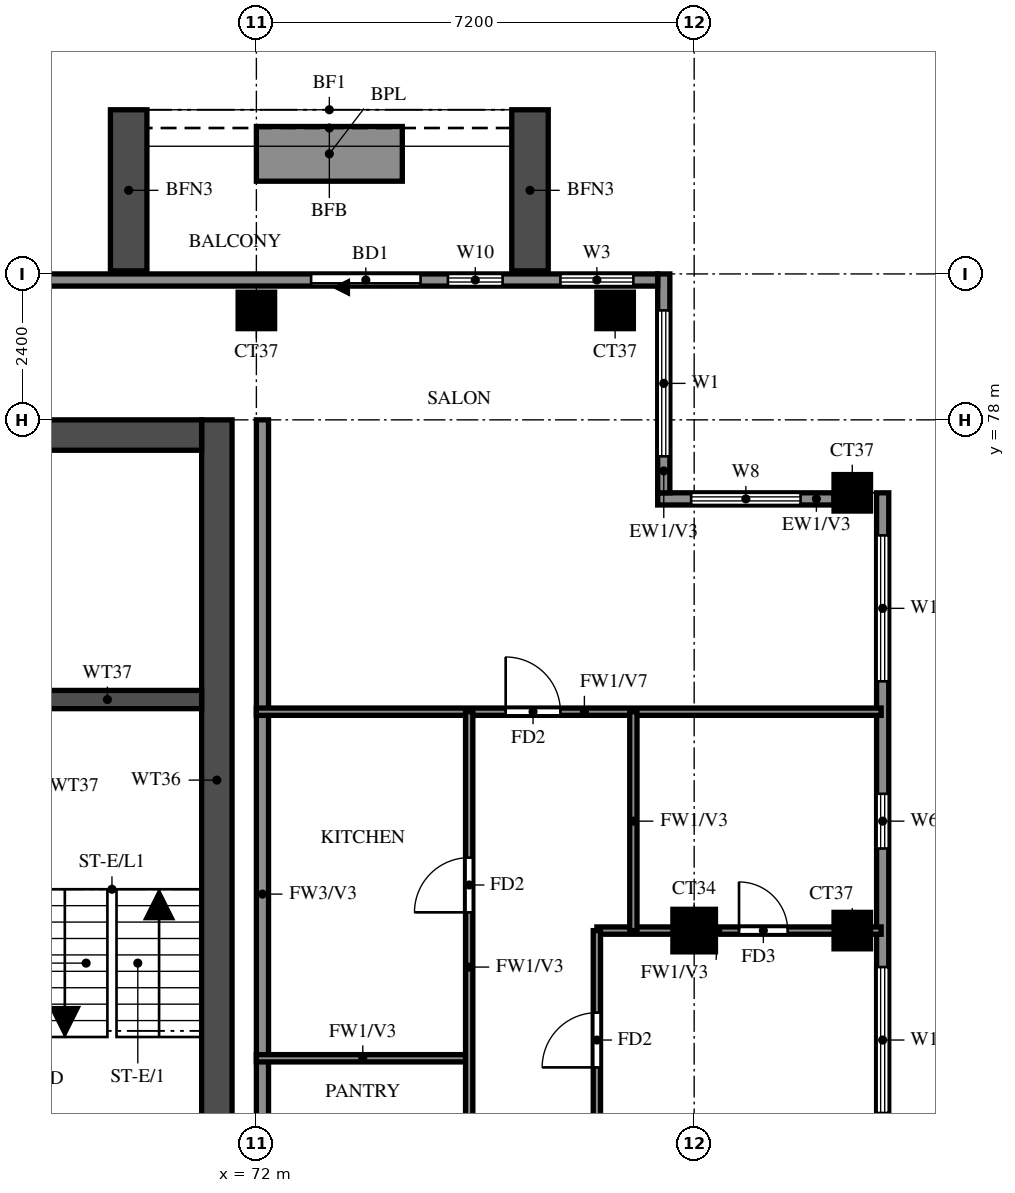
"""IFC4 building model, lengths in metres.
Left out: names, types, materials, properties, quantities, classifications, styles, units other than length and angle.
Written with IfcOpenShell. Run it as: python <this file> out.ifc"""

import sys

from ifc_helpers import new_model, si_unit, direction, frame, frame_2d, origin, origin_2d, place, context, subcontext, project, spatial, rectangle, extrude, source, transform, mapped, element, fill, save


model = new_model("IFC4")
c1 = context("Model", 3, precision=1e-05, world=origin(), true_north=direction((0.0, 1.0)))
c2 = subcontext(c1, "Body", "Model", "MODEL_VIEW")
j1 = project(units=[si_unit("LENGTHUNIT", "METRE"), si_unit("PLANEANGLEUNIT", "RADIAN")], contexts=[c1])
p1 = place(None, origin())
s1 = spatial("IfcSite", under=j1, at=p1, CompositionType="ELEMENT")
p2 = place(p1, origin())
s2 = spatial("IfcBuilding", under=s1, at=p2, CompositionType="ELEMENT")
p3 = place(p2, frame((0.0, 0.0, 257.0)))
s3 = spatial("IfcBuildingStorey", under=s2, at=p3, CompositionType="ELEMENT", Elevation=257.0)
m1 = source(origin(), c2, "Body", "SweptSolid", [
    extrude(rectangle(XDim=0.7, YDim=0.7, at=origin_2d()), origin(), (0.0, 0.0, 1.0), 3.22),
])
p4 = place(p3, frame((79.2, 69.6, 0.0), z_axis=(0.0, 0.0, 1.0), x_axis=(1.0, 0.0, 0.0)))
e1 = element("IfcColumn", 1, at=p4, inside=s3, PredefinedType="COLUMN", context=c2, shape_type="MappedRepresentation", body=[
    mapped(m1, transform((0.0, 0.0, 0.0))),
])
m2 = source(origin(), c2, "Body", "SweptSolid", [
    extrude(rectangle(XDim=0.6, YDim=0.6, at=origin_2d()), origin(), (0.0, 0.0, 1.0), 3.22),
])
for number, where, z_axis, x_axis in (
    (2, (81.8, 69.6, 0.0), (0.0, 0.0, 1.0), (1.0, 0.0, 0.0)),
    (3, (81.8, 76.8, 0.0), (0.0, 0.0, 1.0), (1.0, 0.0, 0.0)),
    (4, (72.0, 79.8, 0.0), (0.0, 0.0, 1.0), (1.0, 0.0, 0.0)),
    (5, (77.9, 79.8, 0.0), (0.0, 0.0, 1.0), (1.0, 0.0, 0.0)),
):
    element("IfcColumn", number, at=place(p3, frame(where, z_axis=z_axis, x_axis=x_axis)), inside=s3, PredefinedType="COLUMN", context=c2, shape_type="MappedRepresentation", body=[
        mapped(m2, transform((0.0, 0.0, 0.0))),
    ])
p5 = place(p3, frame((71.35, 66.15, 0.0), z_axis=(0.0, 0.0, 1.0), x_axis=(0.0, 1.0, 0.0)))
e6 = element("IfcWall", 6, at=p5, inside=s3, PredefinedType="SHEAR", context=c2, shape_type="SweptSolid", body=[
    extrude(rectangle(XDim=11.85, YDim=0.5, at=frame_2d((5.925, 0.0))), origin(), (0.0, 0.0, 1.0), 3.22),
])
p6 = place(p3, frame((29.7, 77.75, 0.0), z_axis=(0.0, 0.0, 1.0), x_axis=(1.0, 0.0, 0.0)))
e7 = element("IfcWall", 7, at=p6, inside=s3, PredefinedType="SHEAR", context=c2, shape_type="SweptSolid", body=[
    extrude(rectangle(XDim=41.4, YDim=0.5, at=frame_2d((20.7, 0.0))), origin(), (0.0, 0.0, 1.0), 3.22),
])
p7 = place(p3, frame((68.0, 73.4, 0.0), z_axis=(0.0, 0.0, 1.0), x_axis=(1.0, 0.0, 0.0)))
e8 = element("IfcWall", 8, at=p7, inside=s3, PredefinedType="SHEAR", context=c2, shape_type="SweptSolid", body=[
    extrude(rectangle(XDim=3.1, YDim=0.3, at=frame_2d((1.55, 0.0))), origin(), (0.0, 0.0, 1.0), 3.22),
])
p8 = place(p3, frame((82.3, 48.2, 0.0), z_axis=(0.0, 0.0, 1.0), x_axis=(0.0, 1.0, 0.0)))
e9 = element("IfcWall", 9, at=p8, inside=s3, PredefinedType="SOLIDWALL", context=c2, shape_type="SweptSolid", body=[
    extrude(rectangle(XDim=28.6, YDim=0.2, at=frame_2d((14.3, 0.0))), origin(), (0.0, 0.0, 1.0), 3.22),
])
p9 = place(p8, frame((7.9, 0.0, 0.0)))
e10 = element("IfcOpeningElement", 10, at=p9, cuts=e9, PredefinedType="OPENING", context=c2, shape_type="SweptSolid", body=[
    extrude(rectangle(XDim=1.8, YDim=2.4, at=frame_2d((0.9, 1.2))), frame((0.0, 0.11, 0.0), z_axis=(0.0, -1.0, 0.0), x_axis=(1.0, 0.0, 0.0)), (0.0, 0.0, 1.0), 0.22),
])
p10 = place(p8, frame((0.6, 0.0, 0.6)))
e11 = element("IfcOpeningElement", 11, at=p10, cuts=e9, PredefinedType="OPENING", context=c2, shape_type="SweptSolid", body=[
    extrude(rectangle(XDim=2.4, YDim=2.4, at=frame_2d((1.2, 1.2))), frame((0.0, 0.11, 0.0), z_axis=(0.0, -1.0, 0.0), x_axis=(1.0, 0.0, 0.0)), (0.0, 0.0, 1.0), 0.22),
])
p11 = place(p8, frame((3.55, 0.0, 0.6)))
e12 = element("IfcOpeningElement", 12, at=p11, cuts=e9, PredefinedType="OPENING", context=c2, shape_type="SweptSolid", body=[
    extrude(rectangle(XDim=0.9, YDim=2.4, at=frame_2d((0.45, 1.2))), frame((0.0, 0.11, 0.0), z_axis=(0.0, -1.0, 0.0), x_axis=(1.0, 0.0, 0.0)), (0.0, 0.0, 1.0), 0.22),
])
p12 = place(p8, frame((5.5, 0.0, 0.6)))
e13 = element("IfcOpeningElement", 13, at=p12, cuts=e9, PredefinedType="OPENING", context=c2, shape_type="SweptSolid", body=[
    extrude(rectangle(XDim=1.2, YDim=2.4, at=frame_2d((0.6, 1.2))), frame((0.0, 0.11, 0.0), z_axis=(0.0, -1.0, 0.0), x_axis=(1.0, 0.0, 0.0)), (0.0, 0.0, 1.0), 0.22),
])
p13 = place(p8, frame((10.15, 0.0, 0.6)))
e14 = element("IfcOpeningElement", 14, at=p13, cuts=e9, PredefinedType="OPENING", context=c2, shape_type="SweptSolid", body=[
    extrude(rectangle(XDim=0.9, YDim=2.4, at=frame_2d((0.45, 1.2))), frame((0.0, 0.11, 0.0), z_axis=(0.0, -1.0, 0.0), x_axis=(1.0, 0.0, 0.0)), (0.0, 0.0, 1.0), 0.22),
])
p14 = place(p8, frame((12.1, 0.0, 0.6)))
e15 = element("IfcOpeningElement", 15, at=p14, cuts=e9, PredefinedType="OPENING", context=c2, shape_type="SweptSolid", body=[
    extrude(rectangle(XDim=1.8, YDim=2.4, at=frame_2d((0.9, 1.2))), frame((0.0, 0.11, 0.0), z_axis=(0.0, -1.0, 0.0), x_axis=(1.0, 0.0, 0.0)), (0.0, 0.0, 1.0), 0.22),
])
p15 = place(p8, frame((14.8, 0.0, 0.6)))
e16 = element("IfcOpeningElement", 16, at=p15, cuts=e9, PredefinedType="OPENING", context=c2, shape_type="SweptSolid", body=[
    extrude(rectangle(XDim=2.4, YDim=2.4, at=frame_2d((1.2, 1.2))), frame((0.0, 0.11, 0.0), z_axis=(0.0, -1.0, 0.0), x_axis=(1.0, 0.0, 0.0)), (0.0, 0.0, 1.0), 0.22),
])
p16 = place(p8, frame((18.4, 0.0, 0.6)))
e17 = element("IfcOpeningElement", 17, at=p16, cuts=e9, PredefinedType="OPENING", context=c2, shape_type="SweptSolid", body=[
    extrude(rectangle(XDim=2.4, YDim=2.4, at=frame_2d((1.2, 1.2))), frame((0.0, 0.11, 0.0), z_axis=(0.0, -1.0, 0.0), x_axis=(1.0, 0.0, 0.0)), (0.0, 0.0, 1.0), 0.22),
])
p17 = place(p8, frame((22.75, 0.0, 1.5)))
e18 = element("IfcOpeningElement", 18, at=p17, cuts=e9, PredefinedType="OPENING", context=c2, shape_type="SweptSolid", body=[
    extrude(rectangle(XDim=0.9, YDim=0.9, at=frame_2d((0.45, 0.45))), frame((0.0, 0.11, 0.0), z_axis=(0.0, -1.0, 0.0), x_axis=(1.0, 0.0, 0.0)), (0.0, 0.0, 1.0), 0.22),
])
p18 = place(p8, frame((25.5, 0.0, 0.6)))
e19 = element("IfcOpeningElement", 19, at=p18, cuts=e9, PredefinedType="OPENING", context=c2, shape_type="SweptSolid", body=[
    extrude(rectangle(XDim=2.4, YDim=2.4, at=frame_2d((1.2, 1.2))), frame((0.0, 0.11, 0.0), z_axis=(0.0, -1.0, 0.0), x_axis=(1.0, 0.0, 0.0)), (0.0, 0.0, 1.0), 0.22),
])
p19 = place(p3, frame((81.5, 76.7, 0.0), z_axis=(0.0, 0.0, 1.0), x_axis=(-1.0, 0.0, 0.0)))
e20 = element("IfcWall", 20, at=p19, inside=s3, PredefinedType="SOLIDWALL", context=c2, shape_type="SweptSolid", body=[
    extrude(rectangle(XDim=2.9, YDim=0.2, at=frame_2d((1.45, 0.0))), origin(), (0.0, 0.0, 1.0), 3.22),
])
p20 = place(p19, frame((0.55, 0.0, 0.6)))
e21 = element("IfcOpeningElement", 21, at=p20, cuts=e20, PredefinedType="OPENING", context=c2, shape_type="SweptSolid", body=[
    extrude(rectangle(XDim=1.8, YDim=2.4, at=frame_2d((0.9, 1.2))), frame((0.0, 0.11, 0.0), z_axis=(0.0, -1.0, 0.0), x_axis=(1.0, 0.0, 0.0)), (0.0, 0.0, 1.0), 0.22),
])
p21 = place(p3, frame((78.7, 76.8, 0.0), z_axis=(0.0, 0.0, 1.0), x_axis=(0.0, 1.0, 0.0)))
e22 = element("IfcWall", 22, at=p21, inside=s3, PredefinedType="SOLIDWALL", context=c2, shape_type="SweptSolid", body=[
    extrude(rectangle(XDim=3.6, YDim=0.2, at=frame_2d((1.8, 0.0))), origin(), (0.0, 0.0, 1.0), 3.22),
])
p22 = place(p21, frame((0.6, 0.0, 0.6)))
e23 = element("IfcOpeningElement", 23, at=p22, cuts=e22, PredefinedType="OPENING", context=c2, shape_type="SweptSolid", body=[
    extrude(rectangle(XDim=2.4, YDim=2.4, at=frame_2d((1.2, 1.2))), frame((0.0, 0.11, 0.0), z_axis=(0.0, -1.0, 0.0), x_axis=(1.0, 0.0, 0.0)), (0.0, 0.0, 1.0), 0.22),
])
p23 = place(p3, frame((78.6, 80.3, 0.0), z_axis=(0.0, 0.0, 1.0), x_axis=(-1.0, 0.0, 0.0)))
e24 = element("IfcWall", 24, at=p23, inside=s3, PredefinedType="SOLIDWALL", context=c2, shape_type="SweptSolid", body=[
    extrude(rectangle(XDim=56.6, YDim=0.2, at=frame_2d((28.3, 0.0))), origin(), (0.0, 0.0, 1.0), 3.22),
])
p24 = place(p23, frame((3.9, 0.0, 0.0)))
e25 = element("IfcOpeningElement", 25, at=p24, cuts=e24, PredefinedType="OPENING", context=c2, shape_type="SweptSolid", body=[
    extrude(rectangle(XDim=1.8, YDim=2.4, at=frame_2d((0.9, 1.2))), frame((0.0, 0.11, 0.0), z_axis=(0.0, -1.0, 0.0), x_axis=(1.0, 0.0, 0.0)), (0.0, 0.0, 1.0), 0.22),
])
p25 = place(p23, frame((50.433, 0.0, 0.6)))
e26 = element("IfcOpeningElement", 26, at=p25, cuts=e24, PredefinedType="OPENING", context=c2, shape_type="SweptSolid", body=[
    extrude(rectangle(XDim=2.4, YDim=2.4, at=frame_2d((1.2, 1.2))), frame((0.0, 0.11, 0.0), z_axis=(0.0, -1.0, 0.0), x_axis=(1.0, 0.0, 0.0)), (0.0, 0.0, 1.0), 0.22),
])
p26 = place(p23, frame((53.367, 0.0, 0.6)))
e27 = element("IfcOpeningElement", 27, at=p26, cuts=e24, PredefinedType="OPENING", context=c2, shape_type="SweptSolid", body=[
    extrude(rectangle(XDim=2.4, YDim=2.4, at=frame_2d((1.2, 1.2))), frame((0.0, 0.11, 0.0), z_axis=(0.0, -1.0, 0.0), x_axis=(1.0, 0.0, 0.0)), (0.0, 0.0, 1.0), 0.22),
])
p27 = place(p23, frame((0.4, 0.0, 0.6)))
e28 = element("IfcOpeningElement", 28, at=p27, cuts=e24, PredefinedType="OPENING", context=c2, shape_type="SweptSolid", body=[
    extrude(rectangle(XDim=1.2, YDim=2.4, at=frame_2d((0.6, 1.2))), frame((0.0, 0.11, 0.0), z_axis=(0.0, -1.0, 0.0), x_axis=(1.0, 0.0, 0.0)), (0.0, 0.0, 1.0), 0.22),
])
p28 = place(p23, frame((2.55, 0.0, 0.6)))
e29 = element("IfcOpeningElement", 29, at=p28, cuts=e24, PredefinedType="OPENING", context=c2, shape_type="SweptSolid", body=[
    extrude(rectangle(XDim=0.9, YDim=2.4, at=frame_2d((0.45, 1.2))), frame((0.0, 0.11, 0.0), z_axis=(0.0, -1.0, 0.0), x_axis=(1.0, 0.0, 0.0)), (0.0, 0.0, 1.0), 0.22),
])
for number, where, z_axis, x_axis in (
    (30, (76.5, 80.45, 0.0), (0.0, 0.0, 1.0), (0.0, 1.0, 0.0)),
    (31, (69.9, 80.45, 0.0), (0.0, 0.0, 1.0), (0.0, 1.0, 0.0)),
):
    element("IfcWall", number, at=place(p3, frame(where, z_axis=z_axis, x_axis=x_axis)), inside=s3, PredefinedType="SOLIDWALL", context=c2, shape_type="SweptSolid", body=[
        extrude(rectangle(XDim=2.65, YDim=0.6, at=frame_2d((1.325, 0.0))), origin(), (0.0, 0.0, 1.0), 2.85),
    ])
p29 = place(p3, frame((74.4, 82.375, 0.0), z_axis=(0.0, 0.0, 1.0), x_axis=(-1.0, 0.0, 0.0)))
e32 = element("IfcWall", 32, at=p29, inside=s3, PredefinedType="SOLIDWALL", context=c2, shape_type="SweptSolid", body=[
    extrude(rectangle(XDim=2.4, YDim=0.9, at=frame_2d((1.2, 0.0))), origin(), (0.0, 0.0, 1.0), 0.9),
])
p30 = place(p3, frame((72.1, 62.4, 0.0), z_axis=(0.0, 0.0, 1.0), x_axis=(0.0, 1.0, 0.0)))
e33 = element("IfcWall", 33, at=p30, inside=s3, PredefinedType="SOLIDWALL", context=c2, shape_type="SweptSolid", body=[
    extrude(rectangle(XDim=15.6, YDim=0.2, at=frame_2d((7.8, 0.0))), origin(), (0.0, 0.0, 1.0), 3.22),
])
p31 = place(p3, frame((72.0, 67.5, 0.0), z_axis=(0.0, 0.0, 1.0), x_axis=(1.0, 0.0, 0.0)))
e34 = element("IfcWall", 34, at=p31, inside=s3, PredefinedType="PARTITIONING", context=c2, shape_type="SweptSolid", body=[
    extrude(rectangle(XDim=3.5, YDim=0.12, at=frame_2d((1.75, 0.0))), origin(), (0.0, 0.0, 1.0), 3.22),
])
p32 = place(p3, frame((77.6, 69.6, 0.0), z_axis=(0.0, 0.0, 1.0), x_axis=(1.0, 0.0, 0.0)))
e35 = element("IfcWall", 35, at=p32, inside=s3, PredefinedType="PARTITIONING", context=c2, shape_type="SweptSolid", body=[
    extrude(rectangle(XDim=4.675, YDim=0.12, at=frame_2d((2.337, 0.0))), origin(), (0.0, 0.0, 1.0), 3.22),
])
p33 = place(p32, frame((2.337, 0.0, 0.0)))
e36 = element("IfcOpeningElement", 36, at=p33, cuts=e35, PredefinedType="OPENING", context=c2, shape_type="SweptSolid", body=[
    extrude(rectangle(XDim=0.8, YDim=2.1, at=frame_2d((0.4, 1.05))), frame((0.0, 0.07, 0.0), z_axis=(0.0, -1.0, 0.0), x_axis=(1.0, 0.0, 0.0)), (0.0, 0.0, 1.0), 0.14),
])
p34 = place(p3, frame((72.0, 73.2, 0.0), z_axis=(0.0, 0.0, 1.0), x_axis=(1.0, 0.0, 0.0)))
e37 = element("IfcWall", 37, at=p34, inside=s3, PredefinedType="PARTITIONING", context=c2, shape_type="SweptSolid", body=[
    extrude(rectangle(XDim=10.275, YDim=0.12, at=frame_2d((5.137, 0.0))), origin(), (0.0, 0.0, 1.0), 2.32),
])
p35 = place(p34, frame((4.1, 0.0, 0.0)))
e38 = element("IfcOpeningElement", 38, at=p35, cuts=e37, PredefinedType="OPENING", context=c2, shape_type="SweptSolid", body=[
    extrude(rectangle(XDim=0.9, YDim=2.1, at=frame_2d((0.45, 1.05))), frame((0.0, 0.07, 0.0), z_axis=(0.0, -1.0, 0.0), x_axis=(1.0, 0.0, 0.0)), (0.0, 0.0, 1.0), 0.14),
])
p36 = place(p3, frame((75.5, 64.8, 0.0), z_axis=(0.0, 0.0, 1.0), x_axis=(0.0, 1.0, 0.0)))
e39 = element("IfcWall", 39, at=p36, inside=s3, PredefinedType="PARTITIONING", context=c2, shape_type="SweptSolid", body=[
    extrude(rectangle(XDim=8.4, YDim=0.12, at=frame_2d((4.2, 0.0))), origin(), (0.0, 0.0, 1.0), 3.22),
])
p37 = place(p36, frame((5.1, 0.0, 0.0)))
e40 = element("IfcOpeningElement", 40, at=p37, cuts=e39, PredefinedType="OPENING", context=c2, shape_type="SweptSolid", body=[
    extrude(rectangle(XDim=0.9, YDim=2.1, at=frame_2d((0.45, 1.05))), frame((0.0, 0.07, 0.0), z_axis=(0.0, -1.0, 0.0), x_axis=(1.0, 0.0, 0.0)), (0.0, 0.0, 1.0), 0.14),
])
p38 = place(p3, frame((77.6, 48.125, 0.0), z_axis=(0.0, 0.0, 1.0), x_axis=(0.0, 1.0, 0.0)))
e41 = element("IfcWall", 41, at=p38, inside=s3, PredefinedType="PARTITIONING", context=c2, shape_type="SweptSolid", body=[
    extrude(rectangle(XDim=21.475, YDim=0.12, at=frame_2d((10.738, 0.0))), origin(), (0.0, 0.0, 1.0), 3.22),
])
p39 = place(p38, frame((1.288, 0.0, 0.0)))
e42 = element("IfcOpeningElement", 42, at=p39, cuts=e41, PredefinedType="OPENING", context=c2, shape_type="SweptSolid", body=[
    extrude(rectangle(XDim=0.9, YDim=2.1, at=frame_2d((0.45, 1.05))), frame((0.0, 0.07, 0.0), z_axis=(0.0, -1.0, 0.0), x_axis=(1.0, 0.0, 0.0)), (0.0, 0.0, 1.0), 0.14),
])
p40 = place(p38, frame((4.825, 0.0, 0.0)))
e43 = element("IfcOpeningElement", 43, at=p40, cuts=e41, PredefinedType="OPENING", context=c2, shape_type="SweptSolid", body=[
    extrude(rectangle(XDim=0.9, YDim=2.1, at=frame_2d((0.45, 1.05))), frame((0.0, 0.07, 0.0), z_axis=(0.0, -1.0, 0.0), x_axis=(1.0, 0.0, 0.0)), (0.0, 0.0, 1.0), 0.14),
])
p41 = place(p38, frame((9.925, 0.0, 0.0)))
e44 = element("IfcOpeningElement", 44, at=p41, cuts=e41, PredefinedType="OPENING", context=c2, shape_type="SweptSolid", body=[
    extrude(rectangle(XDim=1.5, YDim=2.1, at=frame_2d((0.75, 1.05))), frame((0.0, 0.07, 0.0), z_axis=(0.0, -1.0, 0.0), x_axis=(1.0, 0.0, 0.0)), (0.0, 0.0, 1.0), 0.14),
])
p42 = place(p38, frame((15.625, 0.0, 0.0)))
e45 = element("IfcOpeningElement", 45, at=p42, cuts=e41, PredefinedType="OPENING", context=c2, shape_type="SweptSolid", body=[
    extrude(rectangle(XDim=0.9, YDim=2.1, at=frame_2d((0.45, 1.05))), frame((0.0, 0.07, 0.0), z_axis=(0.0, -1.0, 0.0), x_axis=(1.0, 0.0, 0.0)), (0.0, 0.0, 1.0), 0.14),
])
p43 = place(p38, frame((19.225, 0.0, 0.0)))
e46 = element("IfcOpeningElement", 46, at=p43, cuts=e41, PredefinedType="OPENING", context=c2, shape_type="SweptSolid", body=[
    extrude(rectangle(XDim=0.9, YDim=2.1, at=frame_2d((0.45, 1.05))), frame((0.0, 0.07, 0.0), z_axis=(0.0, -1.0, 0.0), x_axis=(1.0, 0.0, 0.0)), (0.0, 0.0, 1.0), 0.14),
])
p44 = place(p3, frame((78.2, 69.6, 0.0), z_axis=(0.0, 0.0, 1.0), x_axis=(0.0, 1.0, 0.0)))
e47 = element("IfcWall", 47, at=p44, inside=s3, PredefinedType="PARTITIONING", context=c2, shape_type="SweptSolid", body=[
    extrude(rectangle(XDim=3.6, YDim=0.12, at=frame_2d((1.8, 0.0))), origin(), (0.0, 0.0, 1.0), 3.22),
])
p45 = place(p16, origin())
e48 = element("IfcWindow", 48, at=p45, inside=s3, PartitioningType="DOUBLE_PANEL_VERTICAL", PredefinedType="WINDOW", context=c2, shape_type="SweptSolid", body=[
    extrude(rectangle(XDim=2.4, YDim=2.4, at=frame_2d((1.2, 1.2))), frame((0.0, 0.03, 0.0), z_axis=(0.0, -1.0, 0.0), x_axis=(1.0, 0.0, 0.0)), (0.0, 0.0, 1.0), 0.06),
])
fill(e17, e48)
p46 = place(p17, origin())
e49 = element("IfcWindow", 49, at=p46, inside=s3, PartitioningType="SINGLE_PANEL", PredefinedType="WINDOW", context=c2, shape_type="SweptSolid", body=[
    extrude(rectangle(XDim=0.9, YDim=0.9, at=frame_2d((0.45, 0.45))), frame((0.0, 0.03, 0.0), z_axis=(0.0, -1.0, 0.0), x_axis=(1.0, 0.0, 0.0)), (0.0, 0.0, 1.0), 0.06),
])
fill(e18, e49)
p47 = place(p18, origin())
e50 = element("IfcWindow", 50, at=p47, inside=s3, PartitioningType="DOUBLE_PANEL_VERTICAL", PredefinedType="WINDOW", context=c2, shape_type="SweptSolid", body=[
    extrude(rectangle(XDim=2.4, YDim=2.4, at=frame_2d((1.2, 1.2))), frame((0.0, 0.03, 0.0), z_axis=(0.0, -1.0, 0.0), x_axis=(1.0, 0.0, 0.0)), (0.0, 0.0, 1.0), 0.06),
])
fill(e19, e50)
p48 = place(p20, origin())
e51 = element("IfcWindow", 51, at=p48, inside=s3, PartitioningType="DOUBLE_PANEL_VERTICAL", PredefinedType="WINDOW", context=c2, shape_type="SweptSolid", body=[
    extrude(rectangle(XDim=1.8, YDim=2.4, at=frame_2d((0.9, 1.2))), frame((0.0, 0.03, 0.0), z_axis=(0.0, -1.0, 0.0), x_axis=(1.0, 0.0, 0.0)), (0.0, 0.0, 1.0), 0.06),
])
fill(e21, e51)
p49 = place(p22, origin())
e52 = element("IfcWindow", 52, at=p49, inside=s3, PartitioningType="DOUBLE_PANEL_VERTICAL", PredefinedType="WINDOW", context=c2, shape_type="SweptSolid", body=[
    extrude(rectangle(XDim=2.4, YDim=2.4, at=frame_2d((1.2, 1.2))), frame((0.0, 0.03, 0.0), z_axis=(0.0, -1.0, 0.0), x_axis=(1.0, 0.0, 0.0)), (0.0, 0.0, 1.0), 0.06),
])
fill(e23, e52)
p50 = place(p24, origin())
e53 = element("IfcDoor", 53, at=p50, inside=s3, OperationType="DOUBLE_DOOR_SLIDING", PredefinedType="DOOR", context=c2, shape_type="SweptSolid", body=[
    extrude(rectangle(XDim=1.8, YDim=2.4, at=frame_2d((0.9, 1.2))), frame((0.0, 0.025, 0.0), z_axis=(0.0, -1.0, 0.0), x_axis=(1.0, 0.0, 0.0)), (0.0, 0.0, 1.0), 0.05),
])
fill(e25, e53)
p51 = place(p27, origin())
e54 = element("IfcWindow", 54, at=p51, inside=s3, PartitioningType="SINGLE_PANEL", PredefinedType="WINDOW", context=c2, shape_type="SweptSolid", body=[
    extrude(rectangle(XDim=1.2, YDim=2.4, at=frame_2d((0.6, 1.2))), frame((0.0, 0.03, 0.0), z_axis=(0.0, -1.0, 0.0), x_axis=(1.0, 0.0, 0.0)), (0.0, 0.0, 1.0), 0.06),
])
fill(e28, e54)
p52 = place(p28, origin())
e55 = element("IfcWindow", 55, at=p52, inside=s3, PartitioningType="SINGLE_PANEL", PredefinedType="WINDOW", context=c2, shape_type="SweptSolid", body=[
    extrude(rectangle(XDim=0.9, YDim=2.4, at=frame_2d((0.45, 1.2))), frame((0.0, 0.03, 0.0), z_axis=(0.0, -1.0, 0.0), x_axis=(1.0, 0.0, 0.0)), (0.0, 0.0, 1.0), 0.06),
])
fill(e29, e55)
p53 = place(p43, origin())
e56 = element("IfcDoor", 56, at=p53, inside=s3, OperationType="SINGLE_SWING_LEFT", PredefinedType="DOOR", context=c2, shape_type="SweptSolid", body=[
    extrude(rectangle(XDim=0.9, YDim=2.1, at=frame_2d((0.45, 1.05))), frame((0.0, 0.025, 0.0), z_axis=(0.0, -1.0, 0.0), x_axis=(1.0, 0.0, 0.0)), (0.0, 0.0, 1.0), 0.05),
])
fill(e46, e56)
p54 = place(p33, origin())
e57 = element("IfcDoor", 57, at=p54, inside=s3, OperationType="SINGLE_SWING_RIGHT", PredefinedType="DOOR", context=c2, shape_type="SweptSolid", body=[
    extrude(rectangle(XDim=0.8, YDim=2.1, at=frame_2d((0.4, 1.05))), frame((0.0, 0.025, 0.0), z_axis=(0.0, -1.0, 0.0), x_axis=(1.0, 0.0, 0.0)), (0.0, 0.0, 1.0), 0.05),
])
fill(e36, e57)
p55 = place(p35, origin())
e58 = element("IfcDoor", 58, at=p55, inside=s3, OperationType="SINGLE_SWING_RIGHT", PredefinedType="DOOR", context=c2, shape_type="SweptSolid", body=[
    extrude(rectangle(XDim=0.9, YDim=2.1, at=frame_2d((0.45, 1.05))), frame((0.0, 0.025, 0.0), z_axis=(0.0, -1.0, 0.0), x_axis=(1.0, 0.0, 0.0)), (0.0, 0.0, 1.0), 0.05),
])
fill(e38, e58)
p56 = place(p37, origin())
e59 = element("IfcDoor", 59, at=p56, inside=s3, OperationType="SINGLE_SWING_LEFT", PredefinedType="DOOR", context=c2, shape_type="SweptSolid", body=[
    extrude(rectangle(XDim=0.9, YDim=2.1, at=frame_2d((0.45, 1.05))), frame((0.0, 0.025, 0.0), z_axis=(0.0, -1.0, 0.0), x_axis=(1.0, 0.0, 0.0)), (0.0, 0.0, 1.0), 0.05),
])
fill(e40, e59)
save(model, sys.argv[1])
